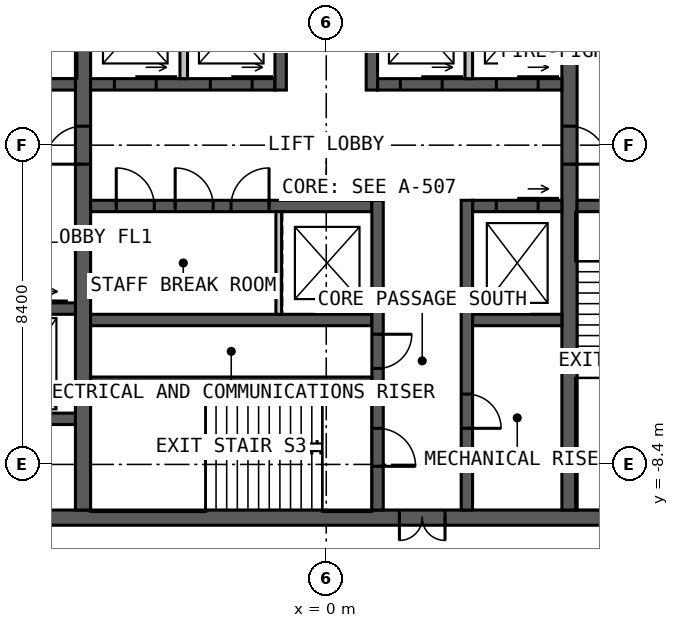
"""IFC4 building model, lengths in metres.
Left out: names, types, materials, properties, quantities, classifications, styles, units other than length and angle.
Written with IfcOpenShell. Run it as: python <this file> out.ifc"""

import sys

from ifc_helpers import new_model, si_unit, direction, frame, frame_2d, origin, place, context, subcontext, project, spatial, rectangle, extrude, element, fill, save


model = new_model("IFC4")
c1 = context("Model", 3, precision=1e-05, world=origin(), true_north=direction((0.0, 1.0)))
c2 = subcontext(c1, "Body", "Model", "MODEL_VIEW")
j1 = project(units=[si_unit("LENGTHUNIT", "METRE"), si_unit("PLANEANGLEUNIT", "RADIAN")], contexts=[c1])
p1 = place(None, origin())
s1 = spatial("IfcSite", under=j1, at=p1, CompositionType="ELEMENT")
p2 = place(p1, origin())
s2 = spatial("IfcBuilding", under=s1, at=p2, CompositionType="ELEMENT")
p3 = place(p2, frame((0.0, 0.0, 228.0)))
s3 = spatial("IfcBuildingStorey", under=s2, at=p3, CompositionType="ELEMENT", Elevation=228.0)
p4 = place(p3, frame((10.0, -9.8, 0.0), z_axis=(0.0, 0.0, 1.0), x_axis=(-1.0, 0.0, 0.0)))
e1 = element("IfcWall", 1, at=p4, inside=s3, PredefinedType="SOLIDWALL", context=c2, shape_type="SweptSolid", body=[
    extrude(rectangle(XDim=20.0, YDim=0.4, at=frame_2d((10.0, 0.0))), origin(), (0.0, 0.0, 1.0), 4.0),
])
p5 = place(p4, frame((6.875, 0.0, 0.0)))
e2 = element("IfcOpeningElement", 2, at=p5, cuts=e1, PredefinedType="OPENING", context=c2, shape_type="SweptSolid", body=[
    extrude(rectangle(XDim=1.2, YDim=2.2, at=frame_2d((0.6, 1.1))), frame((0.0, 0.21, 0.0), z_axis=(0.0, -1.0, 0.0), x_axis=(1.0, 0.0, 0.0)), (0.0, 0.0, 1.0), 0.42),
])
p6 = place(p3, frame((-6.4, -9.6, 0.0), z_axis=(0.0, 0.0, 1.0), x_axis=(0.0, 1.0, 0.0)))
e3 = element("IfcWall", 3, at=p6, inside=s3, PredefinedType="SOLIDWALL", context=c2, shape_type="SweptSolid", body=[
    extrude(rectangle(XDim=19.2, YDim=0.4, at=frame_2d((9.6, 0.0))), origin(), (0.0, 0.0, 1.0), 4.0),
])
p7 = place(p6, frame((9.1, 0.0, 0.0)))
e4 = element("IfcOpeningElement", 4, at=p7, cuts=e3, PredefinedType="OPENING", context=c2, shape_type="SweptSolid", body=[
    extrude(rectangle(XDim=1.0, YDim=2.2, at=frame_2d((0.5, 1.1))), frame((0.0, 0.21, 0.0), z_axis=(0.0, -1.0, 0.0), x_axis=(1.0, 0.0, 0.0)), (0.0, 0.0, 1.0), 0.42),
])
p8 = place(p3, frame((6.4, 9.6, 0.0), z_axis=(0.0, 0.0, 1.0), x_axis=(0.0, -1.0, 0.0)))
e5 = element("IfcWall", 5, at=p8, inside=s3, PredefinedType="SOLIDWALL", context=c2, shape_type="SweptSolid", body=[
    extrude(rectangle(XDim=19.2, YDim=0.4, at=frame_2d((9.6, 0.0))), origin(), (0.0, 0.0, 1.0), 4.0),
])
p9 = place(p8, frame((9.1, 0.0, 0.0)))
e6 = element("IfcOpeningElement", 6, at=p9, cuts=e5, PredefinedType="OPENING", context=c2, shape_type="SweptSolid", body=[
    extrude(rectangle(XDim=1.0, YDim=2.2, at=frame_2d((0.5, 1.1))), frame((0.0, 0.21, 0.0), z_axis=(0.0, -1.0, 0.0), x_axis=(1.0, 0.0, 0.0)), (0.0, 0.0, 1.0), 0.42),
])
p10 = place(p3, frame((-6.2, 1.6, 0.0), z_axis=(0.0, 0.0, 1.0), x_axis=(1.0, 0.0, 0.0)))
e7 = element("IfcWall", 7, at=p10, inside=s3, PredefinedType="SOLIDWALL", context=c2, shape_type="SweptSolid", body=[
    extrude(rectangle(XDim=4.85, YDim=0.3, at=frame_2d((2.425, 0.0))), origin(), (0.0, 0.0, 1.0), 4.0),
])
p11 = place(p10, frame((0.625, 0.0, 0.0)))
e8 = element("IfcOpeningElement", 8, at=p11, cuts=e7, PredefinedType="OPENING", context=c2, shape_type="SweptSolid", body=[
    extrude(rectangle(XDim=1.1, YDim=2.2, at=frame_2d((0.55, 1.1))), frame((0.0, 0.16, 0.0), z_axis=(0.0, -1.0, 0.0), x_axis=(1.0, 0.0, 0.0)), (0.0, 0.0, 1.0), 0.32),
])
p12 = place(p10, frame((3.15, 0.0, 0.0)))
e9 = element("IfcOpeningElement", 9, at=p12, cuts=e7, PredefinedType="OPENING", context=c2, shape_type="SweptSolid", body=[
    extrude(rectangle(XDim=1.1, YDim=2.2, at=frame_2d((0.55, 1.1))), frame((0.0, 0.16, 0.0), z_axis=(0.0, -1.0, 0.0), x_axis=(1.0, 0.0, 0.0)), (0.0, 0.0, 1.0), 0.32),
])
p13 = place(p3, frame((1.35, 1.6, 0.0), z_axis=(0.0, 0.0, 1.0), x_axis=(1.0, 0.0, 0.0)))
e10 = element("IfcWall", 10, at=p13, inside=s3, PredefinedType="SOLIDWALL", context=c2, shape_type="SweptSolid", body=[
    extrude(rectangle(XDim=4.85, YDim=0.3, at=frame_2d((2.425, 0.0))), origin(), (0.0, 0.0, 1.0), 4.0),
])
p14 = place(p13, frame((0.6, 0.0, 0.0)))
e11 = element("IfcOpeningElement", 11, at=p14, cuts=e10, PredefinedType="OPENING", context=c2, shape_type="SweptSolid", body=[
    extrude(rectangle(XDim=1.1, YDim=2.2, at=frame_2d((0.55, 1.1))), frame((0.0, 0.16, 0.0), z_axis=(0.0, -1.0, 0.0), x_axis=(1.0, 0.0, 0.0)), (0.0, 0.0, 1.0), 0.32),
])
p15 = place(p13, frame((3.125, 0.0, 0.0)))
e12 = element("IfcOpeningElement", 12, at=p15, cuts=e10, PredefinedType="OPENING", context=c2, shape_type="SweptSolid", body=[
    extrude(rectangle(XDim=1.1, YDim=2.2, at=frame_2d((0.55, 1.1))), frame((0.0, 0.16, 0.0), z_axis=(0.0, -1.0, 0.0), x_axis=(1.0, 0.0, 0.0)), (0.0, 0.0, 1.0), 0.32),
])
p16 = place(p3, frame((-1.2, 1.45, 0.0), z_axis=(0.0, 0.0, 1.0), x_axis=(0.0, 1.0, 0.0)))
e13 = element("IfcWall", 13, at=p16, inside=s3, PredefinedType="SOLIDWALL", context=c2, shape_type="SweptSolid", body=[
    extrude(rectangle(XDim=8.15, YDim=0.3, at=frame_2d((4.075, 0.0))), origin(), (0.0, 0.0, 1.0), 4.0),
])
p17 = place(p16, frame((5.05, 0.0, 0.0)))
e14 = element("IfcOpeningElement", 14, at=p17, cuts=e13, PredefinedType="OPENING", context=c2, shape_type="SweptSolid", body=[
    extrude(rectangle(XDim=1.0, YDim=2.2, at=frame_2d((0.5, 1.1))), frame((0.0, 0.16, 0.0), z_axis=(0.0, -1.0, 0.0), x_axis=(1.0, 0.0, 0.0)), (0.0, 0.0, 1.0), 0.32),
])
p18 = place(p3, frame((1.2, 1.45, 0.0), z_axis=(0.0, 0.0, 1.0), x_axis=(0.0, 1.0, 0.0)))
e15 = element("IfcWall", 15, at=p18, inside=s3, PredefinedType="SOLIDWALL", context=c2, shape_type="SweptSolid", body=[
    extrude(rectangle(XDim=8.15, YDim=0.3, at=frame_2d((4.075, 0.0))), origin(), (0.0, 0.0, 1.0), 4.0),
])
p19 = place(p18, frame((3.8, 0.0, 0.0)))
e16 = element("IfcOpeningElement", 16, at=p19, cuts=e15, PredefinedType="OPENING", context=c2, shape_type="SweptSolid", body=[
    extrude(rectangle(XDim=1.0, YDim=2.2, at=frame_2d((0.5, 1.1))), frame((0.0, 0.16, 0.0), z_axis=(0.0, -1.0, 0.0), x_axis=(1.0, 0.0, 0.0)), (0.0, 0.0, 1.0), 0.32),
])
p20 = place(p18, frame((6.15, 0.0, 0.0)))
e17 = element("IfcOpeningElement", 17, at=p20, cuts=e15, PredefinedType="OPENING", context=c2, shape_type="SweptSolid", body=[
    extrude(rectangle(XDim=1.0, YDim=2.2, at=frame_2d((0.5, 1.1))), frame((0.0, 0.16, 0.0), z_axis=(0.0, -1.0, 0.0), x_axis=(1.0, 0.0, 0.0)), (0.0, 0.0, 1.0), 0.32),
])
p21 = place(p3, frame((-6.2, -1.6, 0.0), z_axis=(0.0, 0.0, 1.0), x_axis=(1.0, 0.0, 0.0)))
e18 = element("IfcWall", 18, at=p21, inside=s3, PredefinedType="SOLIDWALL", context=c2, shape_type="SweptSolid", body=[
    extrude(rectangle(XDim=7.4, YDim=0.3, at=frame_2d((3.7, 0.0))), origin(), (0.0, 0.0, 1.0), 4.0),
])
p22 = place(p21, frame((0.675, 0.0, 0.0)))
e19 = element("IfcOpeningElement", 19, at=p22, cuts=e18, PredefinedType="OPENING", context=c2, shape_type="SweptSolid", body=[
    extrude(rectangle(XDim=1.0, YDim=2.2, at=frame_2d((0.5, 1.1))), frame((0.0, 0.16, 0.0), z_axis=(0.0, -1.0, 0.0), x_axis=(1.0, 0.0, 0.0)), (0.0, 0.0, 1.0), 0.32),
])
p23 = place(p21, frame((2.225, 0.0, 0.0)))
e20 = element("IfcOpeningElement", 20, at=p23, cuts=e18, PredefinedType="OPENING", context=c2, shape_type="SweptSolid", body=[
    extrude(rectangle(XDim=1.0, YDim=2.2, at=frame_2d((0.5, 1.1))), frame((0.0, 0.16, 0.0), z_axis=(0.0, -1.0, 0.0), x_axis=(1.0, 0.0, 0.0)), (0.0, 0.0, 1.0), 0.32),
])
p24 = place(p21, frame((3.695, 0.0, 0.0)))
e21 = element("IfcOpeningElement", 21, at=p24, cuts=e18, PredefinedType="OPENING", context=c2, shape_type="SweptSolid", body=[
    extrude(rectangle(XDim=1.0, YDim=2.2, at=frame_2d((0.5, 1.1))), frame((0.0, 0.16, 0.0), z_axis=(0.0, -1.0, 0.0), x_axis=(1.0, 0.0, 0.0)), (0.0, 0.0, 1.0), 0.32),
])
p25 = place(p3, frame((3.85, -1.6, 0.0), z_axis=(0.0, 0.0, 1.0), x_axis=(1.0, 0.0, 0.0)))
e22 = element("IfcWall", 22, at=p25, inside=s3, PredefinedType="SOLIDWALL", context=c2, shape_type="SweptSolid", body=[
    extrude(rectangle(XDim=2.35, YDim=0.3, at=frame_2d((1.175, 0.0))), origin(), (0.0, 0.0, 1.0), 4.0),
])
p26 = place(p25, frame((0.625, 0.0, 0.0)))
e23 = element("IfcOpeningElement", 23, at=p26, cuts=e22, PredefinedType="OPENING", context=c2, shape_type="SweptSolid", body=[
    extrude(rectangle(XDim=1.1, YDim=2.2, at=frame_2d((0.55, 1.1))), frame((0.0, 0.16, 0.0), z_axis=(0.0, -1.0, 0.0), x_axis=(1.0, 0.0, 0.0)), (0.0, 0.0, 1.0), 0.32),
])
p27 = place(p3, frame((-6.2, -4.6, 0.0), z_axis=(0.0, 0.0, 1.0), x_axis=(1.0, 0.0, 0.0)))
e24 = element("IfcWall", 24, at=p27, inside=s3, PredefinedType="SOLIDWALL", context=c2, shape_type="SweptSolid", body=[
    extrude(rectangle(XDim=7.4, YDim=0.3, at=frame_2d((3.7, 0.0))), origin(), (0.0, 0.0, 1.0), 4.0),
])
p28 = place(p3, frame((3.85, -4.6, 0.0), z_axis=(0.0, 0.0, 1.0), x_axis=(1.0, 0.0, 0.0)))
e25 = element("IfcWall", 25, at=p28, inside=s3, PredefinedType="SOLIDWALL", context=c2, shape_type="SweptSolid", body=[
    extrude(rectangle(XDim=2.35, YDim=0.3, at=frame_2d((1.175, 0.0))), origin(), (0.0, 0.0, 1.0), 4.0),
])
p29 = place(p3, frame((1.35, -1.45, 0.0), z_axis=(0.0, 0.0, 1.0), x_axis=(0.0, -1.0, 0.0)))
e26 = element("IfcWall", 26, at=p29, inside=s3, PredefinedType="SOLIDWALL", context=c2, shape_type="SweptSolid", body=[
    extrude(rectangle(XDim=8.15, YDim=0.3, at=frame_2d((4.075, 0.0))), origin(), (0.0, 0.0, 1.0), 4.0),
])
p30 = place(p29, frame((6.0, 0.0, 0.0)))
e27 = element("IfcOpeningElement", 27, at=p30, cuts=e26, PredefinedType="OPENING", context=c2, shape_type="SweptSolid", body=[
    extrude(rectangle(XDim=1.0, YDim=2.2, at=frame_2d((0.5, 1.1))), frame((0.0, 0.16, 0.0), z_axis=(0.0, -1.0, 0.0), x_axis=(1.0, 0.0, 0.0)), (0.0, 0.0, 1.0), 0.32),
])
p31 = place(p29, frame((3.525, 0.0, 0.0)))
e28 = element("IfcOpeningElement", 28, at=p31, cuts=e26, PredefinedType="OPENING", context=c2, shape_type="SweptSolid", body=[
    extrude(rectangle(XDim=0.9, YDim=2.2, at=frame_2d((0.45, 1.1))), frame((0.0, 0.16, 0.0), z_axis=(0.0, -1.0, 0.0), x_axis=(1.0, 0.0, 0.0)), (0.0, 0.0, 1.0), 0.32),
])
p32 = place(p3, frame((3.7, -1.45, 0.0), z_axis=(0.0, 0.0, 1.0), x_axis=(0.0, -1.0, 0.0)))
e29 = element("IfcWall", 29, at=p32, inside=s3, PredefinedType="SOLIDWALL", context=c2, shape_type="SweptSolid", body=[
    extrude(rectangle(XDim=8.15, YDim=0.3, at=frame_2d((4.075, 0.0))), origin(), (0.0, 0.0, 1.0), 4.0),
])
p33 = place(p32, frame((5.1, 0.0, 0.0)))
e30 = element("IfcOpeningElement", 30, at=p33, cuts=e29, PredefinedType="OPENING", context=c2, shape_type="SweptSolid", body=[
    extrude(rectangle(XDim=0.9, YDim=2.2, at=frame_2d((0.45, 1.1))), frame((0.0, 0.16, 0.0), z_axis=(0.0, -1.0, 0.0), x_axis=(1.0, 0.0, 0.0)), (0.0, 0.0, 1.0), 0.32),
])
p34 = place(p3, frame((-6.2, -6.2, 0.0), z_axis=(0.0, 0.0, 1.0), x_axis=(1.0, 0.0, 0.0)))
e31 = element("IfcWall", 31, at=p34, inside=s3, PredefinedType="SOLIDWALL", context=c2, shape_type="SweptSolid", body=[
    extrude(rectangle(XDim=7.4, YDim=0.2, at=frame_2d((3.7, 0.0))), origin(), (0.0, 0.0, 1.0), 4.0),
])
p35 = place(p3, frame((-9.6, 1.6, 0.0), z_axis=(0.0, 0.0, 1.0), x_axis=(1.0, 0.0, 0.0)))
e32 = element("IfcWall", 32, at=p35, inside=s3, PredefinedType="SOLIDWALL", context=c2, shape_type="SweptSolid", body=[
    extrude(rectangle(XDim=3.0, YDim=0.3, at=frame_2d((1.5, 0.0))), origin(), (0.0, 0.0, 1.0), 4.0),
])
p36 = place(p35, frame((1.0, 0.0, 0.0)))
e33 = element("IfcOpeningElement", 33, at=p36, cuts=e32, PredefinedType="OPENING", context=c2, shape_type="SweptSolid", body=[
    extrude(rectangle(XDim=1.0, YDim=2.2, at=frame_2d((0.5, 1.1))), frame((0.0, 0.16, 0.0), z_axis=(0.0, -1.0, 0.0), x_axis=(1.0, 0.0, 0.0)), (0.0, 0.0, 1.0), 0.32),
])
p37 = place(p3, frame((6.6, -1.6, 0.0), z_axis=(0.0, 0.0, 1.0), x_axis=(1.0, 0.0, 0.0)))
e34 = element("IfcWall", 34, at=p37, inside=s3, PredefinedType="SOLIDWALL", context=c2, shape_type="SweptSolid", body=[
    extrude(rectangle(XDim=3.0, YDim=0.3, at=frame_2d((1.5, 0.0))), origin(), (0.0, 0.0, 1.0), 4.0),
])
p38 = place(p37, frame((1.0, 0.0, 0.0)))
e35 = element("IfcOpeningElement", 35, at=p38, cuts=e34, PredefinedType="OPENING", context=c2, shape_type="SweptSolid", body=[
    extrude(rectangle(XDim=1.0, YDim=2.2, at=frame_2d((0.5, 1.1))), frame((0.0, 0.16, 0.0), z_axis=(0.0, -1.0, 0.0), x_axis=(1.0, 0.0, 0.0)), (0.0, 0.0, 1.0), 0.32),
])
p39 = place(p3, frame((-9.6, -4.3, 0.0), z_axis=(0.0, 0.0, 1.0), x_axis=(1.0, 0.0, 0.0)))
e36 = element("IfcWall", 36, at=p39, inside=s3, PredefinedType="SOLIDWALL", context=c2, shape_type="SweptSolid", body=[
    extrude(rectangle(XDim=3.0, YDim=0.3, at=frame_2d((1.5, 0.0))), origin(), (0.0, 0.0, 1.0), 4.0),
])
p40 = place(p39, frame((1.15, 0.0, 0.0)))
e37 = element("IfcOpeningElement", 37, at=p40, cuts=e36, PredefinedType="OPENING", context=c2, shape_type="SweptSolid", body=[
    extrude(rectangle(XDim=1.1, YDim=2.2, at=frame_2d((0.55, 1.1))), frame((0.0, 0.16, 0.0), z_axis=(0.0, -1.0, 0.0), x_axis=(1.0, 0.0, 0.0)), (0.0, 0.0, 1.0), 0.32),
])
p41 = place(p3, frame((-9.6, -7.2, 0.0), z_axis=(0.0, 0.0, 1.0), x_axis=(1.0, 0.0, 0.0)))
e38 = element("IfcWall", 38, at=p41, inside=s3, PredefinedType="SOLIDWALL", context=c2, shape_type="SweptSolid", body=[
    extrude(rectangle(XDim=3.0, YDim=0.3, at=frame_2d((1.5, 0.0))), origin(), (0.0, 0.0, 1.0), 4.0),
])
for number, where, z_axis, x_axis in (
    (39, (-3.75, 1.75, 0.0), (0.0, 0.0, 1.0), (0.0, 1.0, 0.0)),
    (40, (3.75, 1.75, 0.0), (0.0, 0.0, 1.0), (0.0, 1.0, 0.0)),
):
    element("IfcWall", number, at=place(p3, frame(where, z_axis=z_axis, x_axis=x_axis)), inside=s3, PredefinedType="SOLIDWALL", context=c2, shape_type="SweptSolid", body=[
        extrude(rectangle(XDim=2.7, YDim=0.2, at=frame_2d((1.35, 0.0))), origin(), (0.0, 0.0, 1.0), 3.75),
    ])
p42 = place(p3, frame((-1.25, -1.75, 0.0), z_axis=(0.0, 0.0, 1.0), x_axis=(0.0, -1.0, 0.0)))
e41 = element("IfcWall", 41, at=p42, inside=s3, PredefinedType="PARTITIONING", context=c2, shape_type="SweptSolid", body=[
    extrude(rectangle(XDim=2.7, YDim=0.15, at=frame_2d((1.35, 0.0))), origin(), (0.0, 0.0, 1.0), 3.75),
])
p43 = place(p5, origin())
e42 = element("IfcDoor", 42, at=p43, inside=s3, OperationType="DOUBLE_DOOR_SINGLE_SWING", PredefinedType="DOOR", context=c2, shape_type="SweptSolid", body=[
    extrude(rectangle(XDim=1.2, YDim=2.2, at=frame_2d((0.6, 1.1))), frame((0.0, 0.025, 0.0), z_axis=(0.0, -1.0, 0.0), x_axis=(1.0, 0.0, 0.0)), (0.0, 0.0, 1.0), 0.05),
])
fill(e2, e42)
p44 = place(p7, origin())
e43 = element("IfcDoor", 43, at=p44, inside=s3, OperationType="SINGLE_SWING_LEFT", PredefinedType="DOOR", context=c2, shape_type="SweptSolid", body=[
    extrude(rectangle(XDim=1.0, YDim=2.2, at=frame_2d((0.5, 1.1))), frame((0.0, 0.025, 0.0), z_axis=(0.0, -1.0, 0.0), x_axis=(1.0, 0.0, 0.0)), (0.0, 0.0, 1.0), 0.05),
])
fill(e4, e43)
p45 = place(p9, origin())
e44 = element("IfcDoor", 44, at=p45, inside=s3, OperationType="SINGLE_SWING_RIGHT", PredefinedType="DOOR", context=c2, shape_type="SweptSolid", body=[
    extrude(rectangle(XDim=1.0, YDim=2.2, at=frame_2d((0.5, 1.1))), frame((0.0, 0.025, 0.0), z_axis=(0.0, -1.0, 0.0), x_axis=(1.0, 0.0, 0.0)), (0.0, 0.0, 1.0), 0.05),
])
fill(e6, e44)
p46 = place(p30, origin())
e45 = element("IfcDoor", 45, at=p46, inside=s3, OperationType="SINGLE_SWING_RIGHT", PredefinedType="DOOR", context=c2, shape_type="SweptSolid", body=[
    extrude(rectangle(XDim=1.0, YDim=2.2, at=frame_2d((0.5, 1.1))), frame((0.0, 0.025, 0.0), z_axis=(0.0, -1.0, 0.0), x_axis=(1.0, 0.0, 0.0)), (0.0, 0.0, 1.0), 0.05),
])
fill(e27, e45)
p47 = place(p31, origin())
e46 = element("IfcDoor", 46, at=p47, inside=s3, OperationType="SINGLE_SWING_LEFT", PredefinedType="DOOR", context=c2, shape_type="SweptSolid", body=[
    extrude(rectangle(XDim=0.9, YDim=2.2, at=frame_2d((0.45, 1.1))), frame((0.0, 0.025, 0.0), z_axis=(0.0, -1.0, 0.0), x_axis=(1.0, 0.0, 0.0)), (0.0, 0.0, 1.0), 0.05),
])
fill(e28, e46)
p48 = place(p33, origin())
e47 = element("IfcDoor", 47, at=p48, inside=s3, OperationType="SINGLE_SWING_RIGHT", PredefinedType="DOOR", context=c2, shape_type="SweptSolid", body=[
    extrude(rectangle(XDim=0.9, YDim=2.2, at=frame_2d((0.45, 1.1))), frame((0.0, 0.025, 0.0), z_axis=(0.0, -1.0, 0.0), x_axis=(1.0, 0.0, 0.0)), (0.0, 0.0, 1.0), 0.05),
])
fill(e30, e47)
p49 = place(p22, origin())
e48 = element("IfcDoor", 48, at=p49, inside=s3, OperationType="SINGLE_SWING_LEFT", PredefinedType="DOOR", context=c2, shape_type="SweptSolid", body=[
    extrude(rectangle(XDim=1.0, YDim=2.2, at=frame_2d((0.5, 1.1))), frame((0.0, 0.025, 0.0), z_axis=(0.0, -1.0, 0.0), x_axis=(1.0, 0.0, 0.0)), (0.0, 0.0, 1.0), 0.05),
])
fill(e19, e48)
p50 = place(p23, origin())
e49 = element("IfcDoor", 49, at=p50, inside=s3, OperationType="SINGLE_SWING_LEFT", PredefinedType="DOOR", context=c2, shape_type="SweptSolid", body=[
    extrude(rectangle(XDim=1.0, YDim=2.2, at=frame_2d((0.5, 1.1))), frame((0.0, 0.025, 0.0), z_axis=(0.0, -1.0, 0.0), x_axis=(1.0, 0.0, 0.0)), (0.0, 0.0, 1.0), 0.05),
])
fill(e20, e49)
p51 = place(p24, origin())
e50 = element("IfcDoor", 50, at=p51, inside=s3, OperationType="SINGLE_SWING_RIGHT", PredefinedType="DOOR", context=c2, shape_type="SweptSolid", body=[
    extrude(rectangle(XDim=1.0, YDim=2.2, at=frame_2d((0.5, 1.1))), frame((0.0, 0.025, 0.0), z_axis=(0.0, -1.0, 0.0), x_axis=(1.0, 0.0, 0.0)), (0.0, 0.0, 1.0), 0.05),
])
fill(e21, e50)
p52 = place(p11, origin())
e51 = element("IfcDoor", 51, at=p52, inside=s3, OperationType="SLIDING_TO_LEFT", PredefinedType="DOOR", context=c2, shape_type="SweptSolid", body=[
    extrude(rectangle(XDim=1.1, YDim=2.2, at=frame_2d((0.55, 1.1))), frame((0.0, 0.025, 0.0), z_axis=(0.0, -1.0, 0.0), x_axis=(1.0, 0.0, 0.0)), (0.0, 0.0, 1.0), 0.05),
])
fill(e8, e51)
p53 = place(p12, origin())
e52 = element("IfcDoor", 52, at=p53, inside=s3, OperationType="SLIDING_TO_LEFT", PredefinedType="DOOR", context=c2, shape_type="SweptSolid", body=[
    extrude(rectangle(XDim=1.1, YDim=2.2, at=frame_2d((0.55, 1.1))), frame((0.0, 0.025, 0.0), z_axis=(0.0, -1.0, 0.0), x_axis=(1.0, 0.0, 0.0)), (0.0, 0.0, 1.0), 0.05),
])
fill(e9, e52)
p54 = place(p14, origin())
e53 = element("IfcDoor", 53, at=p54, inside=s3, OperationType="SLIDING_TO_LEFT", PredefinedType="DOOR", context=c2, shape_type="SweptSolid", body=[
    extrude(rectangle(XDim=1.1, YDim=2.2, at=frame_2d((0.55, 1.1))), frame((0.0, 0.025, 0.0), z_axis=(0.0, -1.0, 0.0), x_axis=(1.0, 0.0, 0.0)), (0.0, 0.0, 1.0), 0.05),
])
fill(e11, e53)
p55 = place(p15, origin())
e54 = element("IfcDoor", 54, at=p55, inside=s3, OperationType="SLIDING_TO_LEFT", PredefinedType="DOOR", context=c2, shape_type="SweptSolid", body=[
    extrude(rectangle(XDim=1.1, YDim=2.2, at=frame_2d((0.55, 1.1))), frame((0.0, 0.025, 0.0), z_axis=(0.0, -1.0, 0.0), x_axis=(1.0, 0.0, 0.0)), (0.0, 0.0, 1.0), 0.05),
])
fill(e12, e54)
p56 = place(p26, origin())
e55 = element("IfcDoor", 55, at=p56, inside=s3, OperationType="SLIDING_TO_LEFT", PredefinedType="DOOR", context=c2, shape_type="SweptSolid", body=[
    extrude(rectangle(XDim=1.1, YDim=2.2, at=frame_2d((0.55, 1.1))), frame((0.0, 0.025, 0.0), z_axis=(0.0, -1.0, 0.0), x_axis=(1.0, 0.0, 0.0)), (0.0, 0.0, 1.0), 0.05),
])
fill(e23, e55)
save(model, sys.argv[1])
